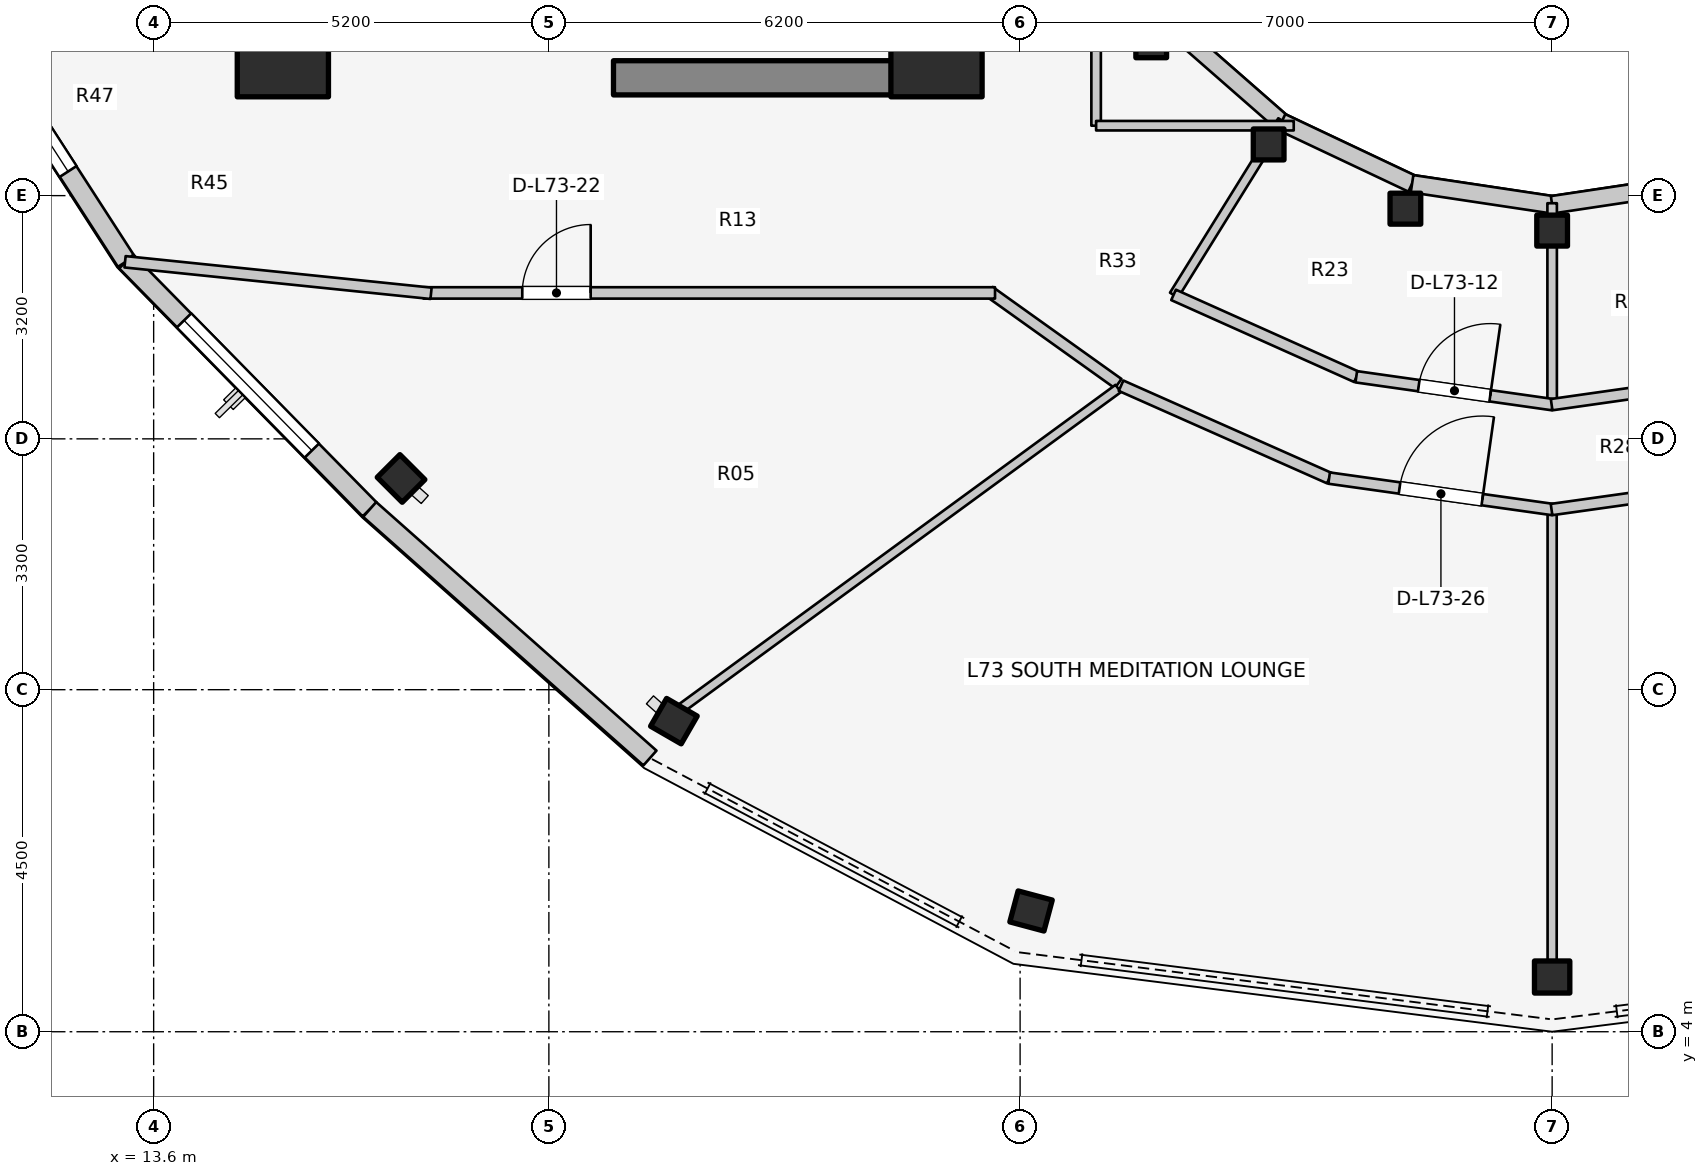
"""IFC4 building model, lengths in metres.
Left out: names, types, materials, properties, quantities, classifications, styles, units other than length and angle.
Written with IfcOpenShell. Run it as: python <this file> out.ifc"""

import sys

from ifc_helpers import new_model, si_unit, direction, frame, frame_2d, origin, origin_2d, place, context, subcontext, project, spatial, rectangle, i_section, extrude, element, fill, save


model = new_model("IFC4")
c1 = context("Model", 3, precision=1e-05, world=origin(), true_north=direction((0.0, 1.0)))
c2 = subcontext(c1, "Body", "Model", "MODEL_VIEW")
j1 = project(units=[si_unit("LENGTHUNIT", "METRE"), si_unit("PLANEANGLEUNIT", "RADIAN")], contexts=[c1])
p1 = place(None, origin())
s1 = spatial("IfcSite", under=j1, at=p1, CompositionType="ELEMENT")
p2 = place(p1, origin())
s2 = spatial("IfcBuilding", under=s1, at=p2, CompositionType="ELEMENT")
p3 = place(p2, frame((0.0, 0.0, 238.8)))
s3 = spatial("IfcBuildingStorey", under=s2, at=p3, CompositionType="ELEMENT", Elevation=238.8)
p4 = place(p3, frame((19.65, 16.55, 0.0), z_axis=(0.0, 0.0, 1.0), x_axis=(1.0, 0.0, 0.0)))
e1 = element("IfcWall", 1, at=p4, inside=s3, PredefinedType="SHEAR", context=c2, shape_type="SweptSolid", body=[
    extrude(rectangle(XDim=4.5, YDim=0.45, at=frame_2d((2.25, 0.0))), origin(), (0.0, 0.0, 1.0), 3.6),
])
for number, where, z_axis, x_axis in (
    (2, (15.3, 16.9, 0.0), (0.0, 0.0, 1.0), (1.0, 0.0, 0.0)),
    (3, (23.9, 16.9, 0.0), (0.0, 0.0, 1.0), (1.0, 0.0, 0.0)),
):
    element("IfcColumn", number, at=place(p3, frame(where, z_axis=z_axis, x_axis=x_axis)), inside=s3, PredefinedType="COLUMN", context=c2, shape_type="SweptSolid", body=[
        extrude(rectangle(XDim=1.2, YDim=1.2, at=origin_2d()), origin(), (0.0, 0.0, 1.0), 3.6),
    ])
p5 = place(p3, frame((26.725, 17.018, 0.0), z_axis=(0.0, 0.0, 1.0), x_axis=(1.0, 0.0, 0.0)))
e4 = element("IfcColumn", 4, at=p5, inside=s3, PredefinedType="COLUMN", context=c2, shape_type="SweptSolid", body=[
    extrude(i_section(OverallWidth=0.404, OverallDepth=0.407, WebThickness=0.027, FlangeThickness=0.044, FilletRadius=0.025, at=origin_2d()), origin(), (0.0, 0.0, 1.0), 3.6),
])
p6 = place(p3, frame((16.855, 11.279, 0.0), z_axis=(0.0, 0.0, 1.0), x_axis=(-0.707106781187, -0.707106781187, 0.0)))
e5 = element("IfcColumn", 5, at=p6, inside=s3, PredefinedType="COLUMN", context=c2, shape_type="SweptSolid", body=[
    extrude(i_section(OverallWidth=0.422, OverallDepth=0.465, WebThickness=0.045, FlangeThickness=0.073, FilletRadius=0.025, at=origin_2d()), origin(), (0.0, 0.0, 1.0), 3.6),
])
p7 = place(p3, frame((28.27, 15.673, 0.0), z_axis=(0.0, 0.0, 1.0), x_axis=(1.0, 0.0, 0.0)))
e6 = element("IfcColumn", 6, at=p7, inside=s3, PredefinedType="COLUMN", context=c2, shape_type="SweptSolid", body=[
    extrude(i_section(OverallWidth=0.404, OverallDepth=0.407, WebThickness=0.027, FlangeThickness=0.044, FilletRadius=0.025, at=origin_2d()), origin(), (0.0, 0.0, 1.0), 3.6),
])
p8 = place(p3, frame((20.445, 8.086, 0.0), z_axis=(0.0, 0.0, 1.0), x_axis=(-0.5, -0.866025403784, 0.0)))
e7 = element("IfcColumn", 7, at=p8, inside=s3, PredefinedType="COLUMN", context=c2, shape_type="SweptSolid", body=[
    extrude(i_section(OverallWidth=0.422, OverallDepth=0.465, WebThickness=0.045, FlangeThickness=0.073, FilletRadius=0.025, at=origin_2d()), origin(), (0.0, 0.0, 1.0), 3.6),
])
p9 = place(p3, frame((30.069, 14.828, 0.0), z_axis=(0.0, 0.0, 1.0), x_axis=(1.0, 0.0, 0.0)))
e8 = element("IfcColumn", 8, at=p9, inside=s3, PredefinedType="COLUMN", context=c2, shape_type="SweptSolid", body=[
    extrude(i_section(OverallWidth=0.404, OverallDepth=0.407, WebThickness=0.027, FlangeThickness=0.044, FilletRadius=0.025, at=origin_2d()), origin(), (0.0, 0.0, 1.0), 3.6),
])
p10 = place(p3, frame((25.144, 5.589, 0.0), z_axis=(0.0, 0.0, 1.0), x_axis=(-0.258819045103, -0.965925826289, 0.0)))
e9 = element("IfcColumn", 9, at=p10, inside=s3, PredefinedType="COLUMN", context=c2, shape_type="SweptSolid", body=[
    extrude(i_section(OverallWidth=0.422, OverallDepth=0.465, WebThickness=0.045, FlangeThickness=0.073, FilletRadius=0.025, at=origin_2d()), origin(), (0.0, 0.0, 1.0), 3.6),
])
p11 = place(p3, frame((32.0, 14.54, 0.0), z_axis=(0.0, 0.0, 1.0), x_axis=(1.0, 0.0, 0.0)))
e10 = element("IfcColumn", 10, at=p11, inside=s3, PredefinedType="COLUMN", context=c2, shape_type="SweptSolid", body=[
    extrude(i_section(OverallWidth=0.404, OverallDepth=0.407, WebThickness=0.027, FlangeThickness=0.044, FilletRadius=0.025, at=origin_2d()), origin(), (0.0, 0.0, 1.0), 3.6),
])
p12 = place(p3, frame((32.0, 4.72, 0.0), z_axis=(0.0, 0.0, 1.0), x_axis=(0.0, -1.0, 0.0)))
e11 = element("IfcColumn", 11, at=p12, inside=s3, PredefinedType="COLUMN", context=c2, shape_type="SweptSolid", body=[
    extrude(i_section(OverallWidth=0.422, OverallDepth=0.465, WebThickness=0.045, FlangeThickness=0.073, FilletRadius=0.025, at=origin_2d()), origin(), (0.0, 0.0, 1.0), 3.6),
])
p13 = place(p3, frame((26.965, 17.258, 0.0), z_axis=(0.0, 0.0, 1.0), x_axis=(0.752576694707, -0.658504607869, 0.0)))
e12 = element("IfcWall", 12, at=p13, inside=s3, PredefinedType="STANDARD", context=c2, shape_type="SweptSolid", body=[
    extrude(rectangle(XDim=1.959, YDim=0.23, at=frame_2d((0.98, 0.0))), origin(), (0.0, 0.0, 1.0), 2.6),
])
p14 = place(p3, frame((28.44, 15.968, 0.0), z_axis=(0.0, 0.0, 1.0), x_axis=(0.904179699603, -0.427152280606, 0.0)))
e13 = element("IfcWall", 13, at=p14, inside=s3, PredefinedType="STANDARD", context=c2, shape_type="SweptSolid", body=[
    extrude(rectangle(XDim=1.899, YDim=0.23, at=frame_2d((0.95, 0.0))), origin(), (0.0, 0.0, 1.0), 2.6),
])
for number, where, z_axis, x_axis in (
    (14, (30.157, 15.157, 0.0), (0.0, 0.0, 1.0), (0.989, -0.149, 0.0)),
    (15, (32.0, 14.88, 0.0), (0.0, 0.0, 1.0), (0.989, 0.149, 0.0)),
):
    element("IfcWall", number, at=place(p3, frame(where, z_axis=z_axis, x_axis=x_axis)), inside=s3, PredefinedType="STANDARD", context=c2, shape_type="SweptSolid", body=[
        extrude(rectangle(XDim=1.864, YDim=0.23, at=frame_2d((0.932, 0.0))), origin(), (0.0, 0.0, 1.0), 2.6),
    ])
p15 = place(p3, frame((10.895, 17.761, 0.0), z_axis=(0.0, 0.0, 1.0), x_axis=(0.542641766008, -0.839964233634, 0.0)))
e16 = element("IfcWall", 16, at=p15, inside=s3, PredefinedType="STANDARD", context=c2, shape_type="SweptSolid", body=[
    extrude(rectangle(XDim=4.319, YDim=0.26, at=frame_2d((2.16, 0.0))), origin(), (0.0, 0.0, 1.0), 3.29),
])
p16 = place(p15, frame((1.41, 0.0, 0.75)))
e17 = element("IfcOpeningElement", 17, at=p16, cuts=e16, PredefinedType="OPENING", context=c2, shape_type="SweptSolid", body=[
    extrude(rectangle(XDim=1.5, YDim=1.6, at=frame_2d((0.75, 0.8))), frame((0.0, 0.14, 0.0), z_axis=(0.0, -1.0, 0.0), x_axis=(1.0, 0.0, 0.0)), (0.0, 0.0, 1.0), 0.28),
])
p17 = place(p3, frame((13.239, 14.133, 0.0), z_axis=(0.0, 0.0, 1.0), x_axis=(0.700642973333, -0.713512034881, 0.0)))
e18 = element("IfcWall", 18, at=p17, inside=s3, PredefinedType="STANDARD", context=c2, shape_type="SweptSolid", body=[
    extrude(rectangle(XDim=4.572, YDim=0.26, at=frame_2d((2.286, 0.0))), origin(), (0.0, 0.0, 1.0), 3.29),
])
p18 = place(p17, frame((1.086, 0.0, 0.75)))
e19 = element("IfcOpeningElement", 19, at=p18, cuts=e18, PredefinedType="OPENING", context=c2, shape_type="SweptSolid", body=[
    extrude(rectangle(XDim=2.4, YDim=1.7, at=frame_2d((1.2, 0.85))), frame((0.0, 0.14, 0.0), z_axis=(0.0, -1.0, 0.0), x_axis=(1.0, 0.0, 0.0)), (0.0, 0.0, 1.0), 0.28),
])
p19 = place(p3, frame((16.442, 10.871, 0.0), z_axis=(0.0, 0.0, 1.0), x_axis=(0.748165854006, -0.663511759428, 0.0)))
e20 = element("IfcWall", 20, at=p19, inside=s3, PredefinedType="STANDARD", context=c2, shape_type="SweptSolid", body=[
    extrude(rectangle(XDim=4.929, YDim=0.26, at=frame_2d((2.464, 0.0))), origin(), (0.0, 0.0, 1.0), 3.29),
])
p20 = place(p3, frame((28.45, 15.985, 0.0), z_axis=(0.0, 0.0, 1.0), x_axis=(-0.527527080983, -0.849538215049, 0.0)))
e21 = element("IfcWall", 21, at=p20, inside=s3, PredefinedType="PARTITIONING", context=c2, shape_type="SweptSolid", body=[
    extrude(rectangle(XDim=2.701, YDim=0.125, at=frame_2d((1.351, 0.0))), origin(), (0.0, 0.0, 1.0), 2.672),
])
p21 = place(p3, frame((32.0, 14.9, 0.0), z_axis=(0.0, 0.0, 1.0), x_axis=(0.0, -1.0, 0.0)))
e22 = element("IfcWall", 22, at=p21, inside=s3, PredefinedType="PARTITIONING", context=c2, shape_type="SweptSolid", body=[
    extrude(rectangle(XDim=2.65, YDim=0.125, at=frame_2d((1.325, 0.0))), origin(), (0.0, 0.0, 1.0), 2.672),
])
p22 = place(p3, frame((27.019, 13.694, 0.0), z_axis=(0.0, 0.0, 1.0), x_axis=(0.912628408652, -0.408790151203, 0.0)))
e23 = element("IfcWall", 23, at=p22, inside=s3, PredefinedType="PARTITIONING", context=c2, shape_type="SweptSolid", body=[
    extrude(rectangle(XDim=2.638, YDim=0.15, at=frame_2d((1.319, 0.0))), origin(), (0.0, 0.0, 1.0), 2.816),
])
p23 = place(p3, frame((29.423, 12.617, 0.0), z_axis=(0.0, 0.0, 1.0), x_axis=(0.990078185178, -0.140517569133, 0.0)))
e24 = element("IfcWall", 24, at=p23, inside=s3, PredefinedType="PARTITIONING", context=c2, shape_type="SweptSolid", body=[
    extrude(rectangle(XDim=2.61, YDim=0.15, at=frame_2d((1.305, 0.0))), origin(), (0.0, 0.0, 1.0), 2.816),
])
p24 = place(p23, frame((0.83, 0.0, 0.0)))
e25 = element("IfcOpeningElement", 25, at=p24, cuts=e24, PredefinedType="OPENING", context=c2, shape_type="SweptSolid", body=[
    extrude(rectangle(XDim=0.95, YDim=2.1, at=frame_2d((0.475, 1.05))), frame((0.0, 0.085, 0.0), z_axis=(0.0, -1.0, 0.0), x_axis=(1.0, 0.0, 0.0)), (0.0, 0.0, 1.0), 0.17),
])
p25 = place(p3, frame((31.993, 12.25, 0.0), z_axis=(0.0, 0.0, 1.0), x_axis=(0.990078185178, 0.140517569133, 0.0)))
e26 = element("IfcWall", 26, at=p25, inside=s3, PredefinedType="PARTITIONING", context=c2, shape_type="SweptSolid", body=[
    extrude(rectangle(XDim=2.61, YDim=0.15, at=frame_2d((1.305, 0.0))), origin(), (0.0, 0.0, 1.0), 2.816),
])
p26 = place(p3, frame((26.0, 15.92, 0.0), z_axis=(0.0, 0.0, 1.0), x_axis=(0.0, 1.0, 0.0)))
e27 = element("IfcWall", 27, at=p26, inside=s3, PredefinedType="PARTITIONING", context=c2, shape_type="SweptSolid", body=[
    extrude(rectangle(XDim=4.28, YDim=0.125, at=frame_2d((2.14, 0.0))), origin(), (0.0, 0.0, 1.0), 2.672),
])
p27 = place(p3, frame((26.0, 15.92, 0.0), z_axis=(0.0, 0.0, 1.0), x_axis=(1.0, 0.0, 0.0)))
e28 = element("IfcWall", 28, at=p27, inside=s3, PredefinedType="PARTITIONING", context=c2, shape_type="SweptSolid", body=[
    extrude(rectangle(XDim=2.6, YDim=0.125, at=frame_2d((1.3, 0.0))), origin(), (0.0, 0.0, 1.0), 2.672),
])
p28 = place(p3, frame((26.29, 12.527, 0.0), z_axis=(0.0, 0.0, 1.0), x_axis=(-0.813780999276, 0.581171648669, 0.0)))
e29 = element("IfcWall", 29, at=p28, inside=s3, PredefinedType="PARTITIONING", context=c2, shape_type="SweptSolid", body=[
    extrude(rectangle(XDim=2.082, YDim=0.15, at=frame_2d((1.041, 0.0))), origin(), (0.0, 0.0, 1.0), 2.816),
])
p29 = place(p3, frame((17.15, 13.72, 0.0), z_axis=(0.0, 0.0, 1.0), x_axis=(1.0, 0.0, 0.0)))
e30 = element("IfcWall", 30, at=p29, inside=s3, PredefinedType="PARTITIONING", context=c2, shape_type="SweptSolid", body=[
    extrude(rectangle(XDim=7.52, YDim=0.15, at=frame_2d((3.76, 0.0))), origin(), (0.0, 0.0, 1.0), 2.816),
])
p30 = place(p29, frame((1.3, 0.0, 0.0)))
e31 = element("IfcOpeningElement", 31, at=p30, cuts=e30, PredefinedType="OPENING", context=c2, shape_type="SweptSolid", body=[
    extrude(rectangle(XDim=0.9, YDim=2.1, at=frame_2d((0.45, 1.05))), frame((0.0, 0.085, 0.0), z_axis=(0.0, -1.0, 0.0), x_axis=(1.0, 0.0, 0.0)), (0.0, 0.0, 1.0), 0.17),
])
p31 = place(p3, frame((17.25, 13.715, 0.0), z_axis=(0.0, 0.0, 1.0), x_axis=(-0.994734711466, 0.102483431859, 0.0)))
e32 = element("IfcWall", 32, at=p31, inside=s3, PredefinedType="PARTITIONING", context=c2, shape_type="SweptSolid", body=[
    extrude(rectangle(XDim=4.047, YDim=0.15, at=frame_2d((2.024, 0.0))), origin(), (0.0, 0.0, 1.0), 2.66),
])
p32 = place(p3, frame((26.291, 12.463, 0.0), z_axis=(0.0, 0.0, 1.0), x_axis=(-0.807095694912, -0.590420646027, 0.0)))
e33 = element("IfcWall", 33, at=p32, inside=s3, PredefinedType="MOVABLE", context=c2, shape_type="SweptSolid", body=[
    extrude(rectangle(XDim=7.119, YDim=0.12, at=frame_2d((3.56, 0.0))), origin(), (0.0, 0.0, 1.0), 2.66),
])
p33 = place(p3, frame((32.0, 10.815, 0.0), z_axis=(0.0, 0.0, 1.0), x_axis=(0.0, -1.0, 0.0)))
e34 = element("IfcWall", 34, at=p33, inside=s3, PredefinedType="MOVABLE", context=c2, shape_type="SweptSolid", body=[
    extrude(rectangle(XDim=5.895, YDim=0.12, at=frame_2d((2.948, 0.0))), origin(), (0.0, 0.0, 1.0), 2.66),
])
p34 = place(p3, frame((26.328, 12.499, 0.0), z_axis=(0.0, 0.0, 1.0), x_axis=(0.914043013008, -0.4056172708, 0.0)))
e35 = element("IfcWall", 35, at=p34, inside=s3, PredefinedType="PARTITIONING", context=c2, shape_type="SweptSolid", body=[
    extrude(rectangle(XDim=2.999, YDim=0.15, at=frame_2d((1.5, 0.0))), origin(), (0.0, 0.0, 1.0), 2.816),
])
p35 = place(p3, frame((29.066, 11.284, 0.0), z_axis=(0.0, 0.0, 1.0), x_axis=(0.990252860391, -0.139281271128, 0.0)))
e36 = element("IfcWall", 36, at=p35, inside=s3, PredefinedType="PARTITIONING", context=c2, shape_type="SweptSolid", body=[
    extrude(rectangle(XDim=2.971, YDim=0.15, at=frame_2d((1.486, 0.0))), origin(), (0.0, 0.0, 1.0), 2.816),
])
p36 = place(p35, frame((0.936, 0.0, 0.0)))
e37 = element("IfcOpeningElement", 37, at=p36, cuts=e36, PredefinedType="OPENING", context=c2, shape_type="SweptSolid", body=[
    extrude(rectangle(XDim=1.1, YDim=2.1, at=frame_2d((0.55, 1.05))), frame((0.0, 0.085, 0.0), z_axis=(0.0, -1.0, 0.0), x_axis=(1.0, 0.0, 0.0)), (0.0, 0.0, 1.0), 0.17),
])
p37 = place(p3, frame((31.992, 10.87, 0.0), z_axis=(0.0, 0.0, 1.0), x_axis=(0.990252860391, 0.139281271128, 0.0)))
e38 = element("IfcWall", 38, at=p37, inside=s3, PredefinedType="PARTITIONING", context=c2, shape_type="SweptSolid", body=[
    extrude(rectangle(XDim=2.971, YDim=0.15, at=frame_2d((1.486, 0.0))), origin(), (0.0, 0.0, 1.0), 2.816),
])
p38 = place(p16, origin())
e39 = element("IfcWindow", 39, at=p38, inside=s3, PartitioningType="SINGLE_PANEL", PredefinedType="WINDOW", context=c2, shape_type="SweptSolid", body=[
    extrude(rectangle(XDim=1.5, YDim=1.6, at=frame_2d((0.75, 0.8))), frame((0.0, 0.03, 0.0), z_axis=(0.0, -1.0, 0.0), x_axis=(1.0, 0.0, 0.0)), (0.0, 0.0, 1.0), 0.06),
])
fill(e17, e39)
p39 = place(p18, origin())
e40 = element("IfcWindow", 40, at=p39, inside=s3, PartitioningType="SINGLE_PANEL", PredefinedType="WINDOW", context=c2, shape_type="SweptSolid", body=[
    extrude(rectangle(XDim=2.4, YDim=1.7, at=frame_2d((1.2, 0.85))), frame((0.0, 0.03, 0.0), z_axis=(0.0, -1.0, 0.0), x_axis=(1.0, 0.0, 0.0)), (0.0, 0.0, 1.0), 0.06),
])
fill(e19, e40)
p40 = place(p24, origin())
e41 = element("IfcDoor", 41, at=p40, inside=s3, OperationType="SINGLE_SWING_RIGHT", PredefinedType="DOOR", context=c2, shape_type="SweptSolid", body=[
    extrude(rectangle(XDim=0.95, YDim=2.1, at=frame_2d((0.475, 1.05))), frame((0.0, 0.025, 0.0), z_axis=(0.0, -1.0, 0.0), x_axis=(1.0, 0.0, 0.0)), (0.0, 0.0, 1.0), 0.05),
])
fill(e25, e41)
p41 = place(p30, origin())
e42 = element("IfcDoor", 42, at=p41, inside=s3, OperationType="SINGLE_SWING_RIGHT", PredefinedType="DOOR", context=c2, shape_type="SweptSolid", body=[
    extrude(rectangle(XDim=0.9, YDim=2.1, at=frame_2d((0.45, 1.05))), frame((0.0, 0.025, 0.0), z_axis=(0.0, -1.0, 0.0), x_axis=(1.0, 0.0, 0.0)), (0.0, 0.0, 1.0), 0.05),
])
fill(e31, e42)
p42 = place(p36, origin())
e43 = element("IfcDoor", 43, at=p42, inside=s3, OperationType="SINGLE_SWING_RIGHT", PredefinedType="DOOR", context=c2, shape_type="SweptSolid", body=[
    extrude(rectangle(XDim=1.1, YDim=2.1, at=frame_2d((0.55, 1.05))), frame((0.0, 0.025, 0.0), z_axis=(0.0, -1.0, 0.0), x_axis=(1.0, 0.0, 0.0)), (0.0, 0.0, 1.0), 0.05),
])
fill(e37, e43)
save(model, sys.argv[1])
